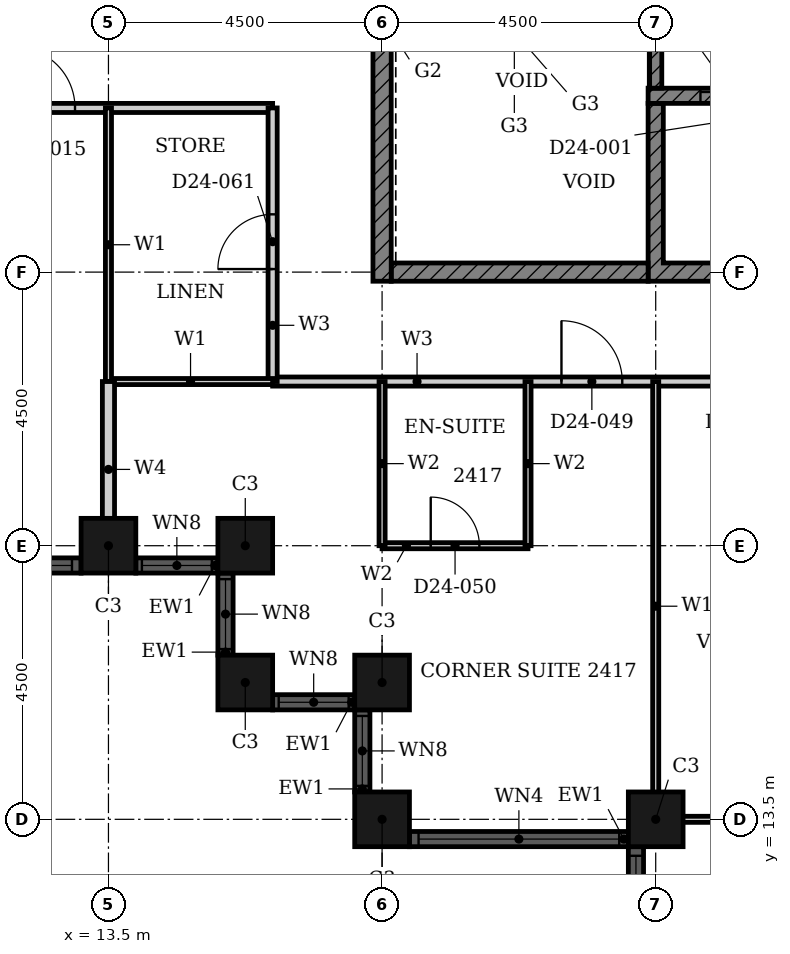
"""IFC4 building model, lengths in metres.
Left out: names, types, materials, properties, quantities, classifications, styles, units other than length and angle.
Written with IfcOpenShell. Run it as: python <this file> out.ifc"""

import sys

from ifc_helpers import new_model, si_unit, direction, frame, frame_2d, origin, origin_2d, place, context, subcontext, project, spatial, polyline, rectangle, hollow_rectangle, outline, extrude, element, fill, save


model = new_model("IFC4")
c1 = context("Model", 3, precision=1e-05, world=origin(), true_north=direction((0.0, 1.0)))
c2 = subcontext(c1, "Body", "Model", "MODEL_VIEW")
j1 = project(units=[si_unit("LENGTHUNIT", "METRE"), si_unit("PLANEANGLEUNIT", "RADIAN")], contexts=[c1])
p1 = place(None, origin())
s1 = spatial("IfcSite", under=j1, at=p1, CompositionType="ELEMENT")
p2 = place(p1, origin())
s2 = spatial("IfcBuilding", under=s1, at=p2, CompositionType="ELEMENT")
p3 = place(p2, frame((0.0, 0.0, 100.8)))
s3 = spatial("IfcBuildingStorey", under=s2, at=p3, CompositionType="ELEMENT", Elevation=100.8)
for number, where, z_axis, x_axis in (
    (1, (13.5, 18.0, 0.0), (0.0, 0.0, 1.0), (1.0, 0.0, 0.0)),
    (2, (15.75, 18.0, 0.0), (0.0, 0.0, 1.0), (1.0, 0.0, 0.0)),
    (3, (15.75, 15.75, 0.0), (0.0, 0.0, 1.0), (1.0, 0.0, 0.0)),
    (4, (18.0, 15.75, 0.0), (0.0, 0.0, 1.0), (1.0, 0.0, 0.0)),
    (5, (18.0, 13.5, 0.0), (0.0, 0.0, 1.0), (1.0, 0.0, 0.0)),
    (6, (22.5, 13.5, 0.0), (0.0, 0.0, 1.0), (1.0, 0.0, 0.0)),
):
    element("IfcColumn", number, at=place(p3, frame(where, z_axis=z_axis, x_axis=x_axis)), inside=s3, PredefinedType="COLUMN", context=c2, shape_type="SweptSolid", body=[
        extrude(hollow_rectangle(XDim=0.9, YDim=0.9, WallThickness=0.028, at=origin_2d()), origin(), (0.0, 0.0, 1.0), 3.6),
    ])
p4 = place(p3, frame((4.95, 17.675, 0.0), z_axis=(0.0, 0.0, 1.0), x_axis=(1.0, 0.0, 0.0)))
e7 = element("IfcWall", 7, at=p4, inside=s3, PredefinedType="SOLIDWALL", context=c2, shape_type="SweptSolid", body=[
    extrude(rectangle(XDim=8.1, YDim=0.25, at=frame_2d((4.05, 0.0))), origin(), (0.0, 0.0, 1.0), 3.6),
])
p5 = place(p4, frame((0.15, 0.0, 0.9)))
e8 = element("IfcOpeningElement", 8, at=p5, cuts=e7, PredefinedType="OPENING", context=c2, shape_type="SweptSolid", body=[
    extrude(rectangle(XDim=3.3, YDim=2.08, at=frame_2d((1.65, 1.04))), frame((0.0, 0.135, 0.0), z_axis=(0.0, -1.0, 0.0), x_axis=(1.0, 0.0, 0.0)), (0.0, 0.0, 1.0), 0.27),
])
p6 = place(p4, frame((4.65, 0.0, 0.9)))
e9 = element("IfcOpeningElement", 9, at=p6, cuts=e7, PredefinedType="OPENING", context=c2, shape_type="SweptSolid", body=[
    extrude(rectangle(XDim=3.3, YDim=2.08, at=frame_2d((1.65, 1.04))), frame((0.0, 0.135, 0.0), z_axis=(0.0, -1.0, 0.0), x_axis=(1.0, 0.0, 0.0)), (0.0, 0.0, 1.0), 0.27),
])
p7 = place(p3, frame((13.95, 17.675, 0.0), z_axis=(0.0, 0.0, 1.0), x_axis=(1.0, 0.0, 0.0)))
e10 = element("IfcWall", 10, at=p7, inside=s3, PredefinedType="SOLIDWALL", context=c2, shape_type="SweptSolid", body=[
    extrude(rectangle(XDim=1.35, YDim=0.25, at=frame_2d((0.675, 0.0))), origin(), (0.0, 0.0, 1.0), 3.6),
])
p8 = place(p7, frame((0.1, 0.0, 0.9)))
e11 = element("IfcOpeningElement", 11, at=p8, cuts=e10, PredefinedType="OPENING", context=c2, shape_type="SweptSolid", body=[
    extrude(rectangle(XDim=1.15, YDim=2.08, at=frame_2d((0.575, 1.04))), frame((0.0, 0.135, 0.0), z_axis=(0.0, -1.0, 0.0), x_axis=(1.0, 0.0, 0.0)), (0.0, 0.0, 1.0), 0.27),
])
p9 = place(p3, frame((15.425, 17.55, 0.0), z_axis=(0.0, 0.0, 1.0), x_axis=(0.0, -1.0, 0.0)))
e12 = element("IfcWall", 12, at=p9, inside=s3, PredefinedType="SOLIDWALL", context=c2, shape_type="SweptSolid", body=[
    extrude(rectangle(XDim=1.35, YDim=0.25, at=frame_2d((0.675, 0.0))), origin(), (0.0, 0.0, 1.0), 3.6),
])
p10 = place(p9, frame((0.1, 0.0, 0.9)))
e13 = element("IfcOpeningElement", 13, at=p10, cuts=e12, PredefinedType="OPENING", context=c2, shape_type="SweptSolid", body=[
    extrude(rectangle(XDim=1.15, YDim=2.08, at=frame_2d((0.575, 1.04))), frame((0.0, 0.135, 0.0), z_axis=(0.0, -1.0, 0.0), x_axis=(1.0, 0.0, 0.0)), (0.0, 0.0, 1.0), 0.27),
])
p11 = place(p3, frame((16.2, 15.425, 0.0), z_axis=(0.0, 0.0, 1.0), x_axis=(1.0, 0.0, 0.0)))
e14 = element("IfcWall", 14, at=p11, inside=s3, PredefinedType="SOLIDWALL", context=c2, shape_type="SweptSolid", body=[
    extrude(rectangle(XDim=1.35, YDim=0.25, at=frame_2d((0.675, 0.0))), origin(), (0.0, 0.0, 1.0), 3.6),
])
p12 = place(p11, frame((0.1, 0.0, 0.9)))
e15 = element("IfcOpeningElement", 15, at=p12, cuts=e14, PredefinedType="OPENING", context=c2, shape_type="SweptSolid", body=[
    extrude(rectangle(XDim=1.15, YDim=2.08, at=frame_2d((0.575, 1.04))), frame((0.0, 0.135, 0.0), z_axis=(0.0, -1.0, 0.0), x_axis=(1.0, 0.0, 0.0)), (0.0, 0.0, 1.0), 0.27),
])
p13 = place(p3, frame((17.675, 15.3, 0.0), z_axis=(0.0, 0.0, 1.0), x_axis=(0.0, -1.0, 0.0)))
e16 = element("IfcWall", 16, at=p13, inside=s3, PredefinedType="SOLIDWALL", context=c2, shape_type="SweptSolid", body=[
    extrude(rectangle(XDim=1.35, YDim=0.25, at=frame_2d((0.675, 0.0))), origin(), (0.0, 0.0, 1.0), 3.6),
])
p14 = place(p13, frame((0.1, 0.0, 0.9)))
e17 = element("IfcOpeningElement", 17, at=p14, cuts=e16, PredefinedType="OPENING", context=c2, shape_type="SweptSolid", body=[
    extrude(rectangle(XDim=1.15, YDim=2.08, at=frame_2d((0.575, 1.04))), frame((0.0, 0.135, 0.0), z_axis=(0.0, -1.0, 0.0), x_axis=(1.0, 0.0, 0.0)), (0.0, 0.0, 1.0), 0.27),
])
p15 = place(p3, frame((18.45, 13.175, 0.0), z_axis=(0.0, 0.0, 1.0), x_axis=(1.0, 0.0, 0.0)))
e18 = element("IfcWall", 18, at=p15, inside=s3, PredefinedType="SOLIDWALL", context=c2, shape_type="SweptSolid", body=[
    extrude(rectangle(XDim=3.6, YDim=0.25, at=frame_2d((1.8, 0.0))), origin(), (0.0, 0.0, 1.0), 3.6),
])
p16 = place(p15, frame((0.15, 0.0, 0.9)))
e19 = element("IfcOpeningElement", 19, at=p16, cuts=e18, PredefinedType="OPENING", context=c2, shape_type="SweptSolid", body=[
    extrude(rectangle(XDim=3.3, YDim=2.08, at=frame_2d((1.65, 1.04))), frame((0.0, 0.135, 0.0), z_axis=(0.0, -1.0, 0.0), x_axis=(1.0, 0.0, 0.0)), (0.0, 0.0, 1.0), 0.27),
])
p17 = place(p3, frame((22.175, 13.05, 0.0), z_axis=(0.0, 0.0, 1.0), x_axis=(0.0, -1.0, 0.0)))
e20 = element("IfcWall", 20, at=p17, inside=s3, PredefinedType="SOLIDWALL", context=c2, shape_type="SweptSolid", body=[
    extrude(rectangle(XDim=8.1, YDim=0.25, at=frame_2d((4.05, 0.0))), origin(), (0.0, 0.0, 1.0), 3.6),
])
p18 = place(p17, frame((0.15, 0.0, 0.9)))
e21 = element("IfcOpeningElement", 21, at=p18, cuts=e20, PredefinedType="OPENING", context=c2, shape_type="SweptSolid", body=[
    extrude(rectangle(XDim=3.3, YDim=2.08, at=frame_2d((1.65, 1.04))), frame((0.0, 0.135, 0.0), z_axis=(0.0, -1.0, 0.0), x_axis=(1.0, 0.0, 0.0)), (0.0, 0.0, 1.0), 0.27),
])
p19 = place(p17, frame((4.65, 0.0, 0.9)))
e22 = element("IfcOpeningElement", 22, at=p19, cuts=e20, PredefinedType="OPENING", context=c2, shape_type="SweptSolid", body=[
    extrude(rectangle(XDim=3.3, YDim=2.08, at=frame_2d((1.65, 1.04))), frame((0.0, 0.135, 0.0), z_axis=(0.0, -1.0, 0.0), x_axis=(1.0, 0.0, 0.0)), (0.0, 0.0, 1.0), 0.27),
])
p20 = place(p3, origin())
e23 = element("IfcWall", 23, at=p20, inside=s3, PredefinedType="SHEAR", context=c2, shape_type="SweptSolid", body=[
    extrude(outline(polyline([(22.375, 22.35), (38.053, 22.35), (38.053, 25.275), (37.803, 25.275), (37.803, 22.65), (35.482, 22.65), (35.482, 25.275), (35.232, 25.275), (35.232, 22.65), (32.911, 22.65), (32.911, 25.275), (32.661, 25.275), (32.661, 22.65), (30.339, 22.65), (30.339, 25.275), (30.089, 25.275), (30.089, 22.65), (27.768, 22.65), (27.768, 25.275), (27.518, 25.275), (27.518, 22.65), (25.197, 22.65), (25.197, 25.275), (24.947, 25.275), (24.947, 22.65), (22.625, 22.65), (22.625, 25.275), (22.375, 25.275), (22.375, 22.35)])), origin(), (0.0, 0.0, 1.0), 3.3),
])
p21 = place(p3, frame((18.15, 22.5, 0.0), z_axis=(0.0, 0.0, 1.0), x_axis=(1.0, 0.0, 0.0)))
e24 = element("IfcWall", 24, at=p21, inside=s3, PredefinedType="SHEAR", context=c2, shape_type="SweptSolid", body=[
    extrude(rectangle(XDim=4.225, YDim=0.3, at=frame_2d((2.113, 0.0))), origin(), (0.0, 0.0, 1.0), 3.3),
])
p22 = place(p3, frame((18.0, 22.35, 0.0), z_axis=(0.0, 0.0, 1.0), x_axis=(0.0, 1.0, 0.0)))
e25 = element("IfcWall", 25, at=p22, inside=s3, PredefinedType="SHEAR", context=c2, shape_type="SweptSolid", body=[
    extrude(rectangle(XDim=9.3, YDim=0.3, at=frame_2d((4.65, 0.0))), origin(), (0.0, 0.0, 1.0), 3.3),
])
p23 = place(p3, frame((22.375, 25.4, 0.0), z_axis=(0.0, 0.0, 1.0), x_axis=(1.0, 0.0, 0.0)))
e26 = element("IfcWall", 26, at=p23, inside=s3, PredefinedType="SHEAR", context=c2, shape_type="SweptSolid", body=[
    extrude(rectangle(XDim=15.678, YDim=0.25, at=frame_2d((7.839, 0.0))), origin(), (0.0, 0.0, 1.0), 3.3),
])
p24 = place(p23, frame((3.432, 0.0, 0.0)))
e27 = element("IfcOpeningElement", 27, at=p24, cuts=e26, PredefinedType="OPENING", context=c2, shape_type="SweptSolid", body=[
    extrude(rectangle(XDim=1.1, YDim=2.1, at=frame_2d((0.55, 1.05))), frame((0.0, 0.135, 0.0), z_axis=(0.0, -1.0, 0.0), x_axis=(1.0, 0.0, 0.0)), (0.0, 0.0, 1.0), 0.27),
])
p25 = place(p23, frame((11.146, 0.0, 0.0)))
e28 = element("IfcOpeningElement", 28, at=p25, cuts=e26, PredefinedType="OPENING", context=c2, shape_type="SweptSolid", body=[
    extrude(rectangle(XDim=1.1, YDim=2.1, at=frame_2d((0.55, 1.05))), frame((0.0, 0.135, 0.0), z_axis=(0.0, -1.0, 0.0), x_axis=(1.0, 0.0, 0.0)), (0.0, 0.0, 1.0), 0.27),
])
p26 = place(p23, frame((13.718, 0.0, 0.0)))
e29 = element("IfcOpeningElement", 29, at=p26, cuts=e26, PredefinedType="OPENING", context=c2, shape_type="SweptSolid", body=[
    extrude(rectangle(XDim=1.1, YDim=2.1, at=frame_2d((0.55, 1.05))), frame((0.0, 0.135, 0.0), z_axis=(0.0, -1.0, 0.0), x_axis=(1.0, 0.0, 0.0)), (0.0, 0.0, 1.0), 0.27),
])
p27 = place(p23, frame((0.861, 0.0, 0.0)))
e30 = element("IfcOpeningElement", 30, at=p27, cuts=e26, PredefinedType="OPENING", context=c2, shape_type="SweptSolid", body=[
    extrude(rectangle(XDim=1.1, YDim=2.1, at=frame_2d((0.55, 1.05))), frame((0.0, 0.135, 0.0), z_axis=(0.0, -1.0, 0.0), x_axis=(1.0, 0.0, 0.0)), (0.0, 0.0, 1.0), 0.27),
])
p28 = place(p3, frame((22.5, 31.35, 0.0), z_axis=(0.0, 0.0, 1.0), x_axis=(0.0, -1.0, 0.0)))
e31 = element("IfcWall", 31, at=p28, inside=s3, PredefinedType="SHEAR", context=c2, shape_type="SweptSolid", body=[
    extrude(rectangle(XDim=5.825, YDim=0.2, at=frame_2d((2.913, 0.0))), origin(), (0.0, 0.0, 1.0), 3.3),
])
p29 = place(p28, frame((0.25, 0.0, 0.0)))
e32 = element("IfcOpeningElement", 32, at=p29, cuts=e31, PredefinedType="OPENING", context=c2, shape_type="SweptSolid", body=[
    extrude(rectangle(XDim=1.8, YDim=2.1, at=frame_2d((0.9, 1.05))), frame((0.0, 0.11, 0.0), z_axis=(0.0, -1.0, 0.0), x_axis=(1.0, 0.0, 0.0)), (0.0, 0.0, 1.0), 0.22),
])
p30 = place(p3, frame((16.2, 20.7, 0.0), z_axis=(0.0, 0.0, 1.0), x_axis=(1.0, 0.0, 0.0)))
e33 = element("IfcWall", 33, at=p30, inside=s3, PredefinedType="PARTITIONING", context=c2, shape_type="SweptSolid", body=[
    extrude(rectangle(XDim=13.5, YDim=0.15, at=frame_2d((6.75, 0.0))), origin(), (0.0, 0.0, 1.0), 3.3),
])
p31 = place(p30, frame((4.75, 0.0, 0.0)))
e34 = element("IfcOpeningElement", 34, at=p31, cuts=e33, PredefinedType="OPENING", context=c2, shape_type="SweptSolid", body=[
    extrude(rectangle(XDim=1.0, YDim=2.1, at=frame_2d((0.5, 1.05))), frame((0.0, 0.085, 0.0), z_axis=(0.0, -1.0, 0.0), x_axis=(1.0, 0.0, 0.0)), (0.0, 0.0, 1.0), 0.17),
])
p32 = place(p30, frame((7.35, 0.0, 0.0)))
e35 = element("IfcOpeningElement", 35, at=p32, cuts=e33, PredefinedType="OPENING", context=c2, shape_type="SweptSolid", body=[
    extrude(rectangle(XDim=0.9, YDim=2.1, at=frame_2d((0.45, 1.05))), frame((0.0, 0.085, 0.0), z_axis=(0.0, -1.0, 0.0), x_axis=(1.0, 0.0, 0.0)), (0.0, 0.0, 1.0), 0.17),
])
p33 = place(p30, frame((10.95, 0.0, 0.0)))
e36 = element("IfcOpeningElement", 36, at=p33, cuts=e33, PredefinedType="OPENING", context=c2, shape_type="SweptSolid", body=[
    extrude(rectangle(XDim=0.9, YDim=2.1, at=frame_2d((0.45, 1.05))), frame((0.0, 0.085, 0.0), z_axis=(0.0, -1.0, 0.0), x_axis=(1.0, 0.0, 0.0)), (0.0, 0.0, 1.0), 0.17),
])
p34 = place(p3, frame((4.5, 25.2, 0.0), z_axis=(0.0, 0.0, 1.0), x_axis=(1.0, 0.0, 0.0)))
e37 = element("IfcWall", 37, at=p34, inside=s3, PredefinedType="PARTITIONING", context=c2, shape_type="SweptSolid", body=[
    extrude(rectangle(XDim=11.7, YDim=0.15, at=frame_2d((5.85, 0.0))), origin(), (0.0, 0.0, 1.0), 3.3),
])
p35 = place(p34, frame((7.45, 0.0, 0.0)))
e38 = element("IfcOpeningElement", 38, at=p35, cuts=e37, PredefinedType="OPENING", context=c2, shape_type="SweptSolid", body=[
    extrude(rectangle(XDim=1.0, YDim=2.1, at=frame_2d((0.5, 1.05))), frame((0.0, 0.085, 0.0), z_axis=(0.0, -1.0, 0.0), x_axis=(1.0, 0.0, 0.0)), (0.0, 0.0, 1.0), 0.17),
])
p36 = place(p34, frame((2.95, 0.0, 0.0)))
e39 = element("IfcOpeningElement", 39, at=p36, cuts=e37, PredefinedType="OPENING", context=c2, shape_type="SweptSolid", body=[
    extrude(rectangle(XDim=1.0, YDim=2.1, at=frame_2d((0.5, 1.05))), frame((0.0, 0.085, 0.0), z_axis=(0.0, -1.0, 0.0), x_axis=(1.0, 0.0, 0.0)), (0.0, 0.0, 1.0), 0.17),
])
p37 = place(p3, frame((16.2, 20.7, 0.0), z_axis=(0.0, 0.0, 1.0), x_axis=(0.0, 1.0, 0.0)))
e40 = element("IfcWall", 40, at=p37, inside=s3, PredefinedType="PARTITIONING", context=c2, shape_type="SweptSolid", body=[
    extrude(rectangle(XDim=4.5, YDim=0.15, at=frame_2d((2.25, 0.0))), origin(), (0.0, 0.0, 1.0), 3.3),
])
p38 = place(p37, frame((1.85, 0.0, 0.0)))
e41 = element("IfcOpeningElement", 41, at=p38, cuts=e40, PredefinedType="OPENING", context=c2, shape_type="SweptSolid", body=[
    extrude(rectangle(XDim=0.9, YDim=2.1, at=frame_2d((0.45, 1.05))), frame((0.0, 0.085, 0.0), z_axis=(0.0, -1.0, 0.0), x_axis=(1.0, 0.0, 0.0)), (0.0, 0.0, 1.0), 0.17),
])
p39 = place(p3, frame((22.31, 13.5, 0.0), z_axis=(0.0, 0.0, 1.0), x_axis=(1.0, 0.0, 0.0)))
e42 = element("IfcWall", 42, at=p39, inside=s3, PredefinedType="PARTITIONING", context=c2, shape_type="SweptSolid", body=[
    extrude(rectangle(XDim=7.39, YDim=0.1, at=frame_2d((3.695, 0.0))), origin(), (0.0, 0.0, 1.0), 2.38),
])
p40 = place(p3, frame((13.5, 20.7, 0.0), z_axis=(0.0, 0.0, 1.0), x_axis=(1.0, 0.0, 0.0)))
e43 = element("IfcWall", 43, at=p40, inside=s3, PredefinedType="PARTITIONING", context=c2, shape_type="SweptSolid", body=[
    extrude(rectangle(XDim=2.7, YDim=0.1, at=frame_2d((1.35, 0.0))), origin(), (0.0, 0.0, 1.0), 3.3),
])
p41 = place(p3, frame((13.5, 20.7, 0.0), z_axis=(0.0, 0.0, 1.0), x_axis=(0.0, 1.0, 0.0)))
e44 = element("IfcWall", 44, at=p41, inside=s3, PredefinedType="PARTITIONING", context=c2, shape_type="SweptSolid", body=[
    extrude(rectangle(XDim=4.5, YDim=0.1, at=frame_2d((2.25, 0.0))), origin(), (0.0, 0.0, 1.0), 2.38),
])
p42 = place(p3, frame((22.5, 13.31, 0.0), z_axis=(0.0, 0.0, 1.0), x_axis=(0.0, 1.0, 0.0)))
e45 = element("IfcWall", 45, at=p42, inside=s3, PredefinedType="PARTITIONING", context=c2, shape_type="SweptSolid", body=[
    extrude(rectangle(XDim=7.39, YDim=0.1, at=frame_2d((3.695, 0.0))), origin(), (0.0, 0.0, 1.0), 3.3),
])
p43 = place(p3, frame((13.5, 17.81, 0.0), z_axis=(0.0, 0.0, 1.0), x_axis=(0.0, 1.0, 0.0)))
e46 = element("IfcWall", 46, at=p43, inside=s3, PredefinedType="PARTITIONING", context=c2, shape_type="SweptSolid", body=[
    extrude(rectangle(XDim=2.89, YDim=0.2, at=frame_2d((1.445, 0.0))), origin(), (0.0, 0.0, 1.0), 2.38),
])
p44 = place(p3, frame((18.0, 18.0, 0.0), z_axis=(0.0, 0.0, 1.0), x_axis=(1.0, 0.0, 0.0)))
e47 = element("IfcWall", 47, at=p44, inside=s3, PredefinedType="PARTITIONING", context=c2, shape_type="SweptSolid", body=[
    extrude(rectangle(XDim=2.4, YDim=0.1, at=frame_2d((1.2, 0.0))), origin(), (0.0, 0.0, 1.0), 3.3),
])
p45 = place(p44, frame((0.8, 0.0, 0.0)))
e48 = element("IfcOpeningElement", 48, at=p45, cuts=e47, PredefinedType="OPENING", context=c2, shape_type="SweptSolid", body=[
    extrude(rectangle(XDim=0.8, YDim=2.1, at=frame_2d((0.4, 1.05))), frame((0.0, 0.06, 0.0), z_axis=(0.0, -1.0, 0.0), x_axis=(1.0, 0.0, 0.0)), (0.0, 0.0, 1.0), 0.12),
])
for number, where, z_axis, x_axis in (
    (49, (18.0, 18.0, 0.0), (0.0, 0.0, 1.0), (0.0, 1.0, 0.0)),
    (50, (20.4, 18.0, 0.0), (0.0, 0.0, 1.0), (0.0, 1.0, 0.0)),
):
    element("IfcWall", number, at=place(p3, frame(where, z_axis=z_axis, x_axis=x_axis)), inside=s3, PredefinedType="PARTITIONING", context=c2, shape_type="SweptSolid", body=[
        extrude(rectangle(XDim=2.7, YDim=0.1, at=frame_2d((1.35, 0.0))), origin(), (0.0, 0.0, 1.0), 3.3),
    ])
p46 = place(p6, origin())
e51 = element("IfcWindow", 51, at=p46, inside=s3, PartitioningType="SINGLE_PANEL", PredefinedType="WINDOW", context=c2, shape_type="SweptSolid", body=[
    extrude(rectangle(XDim=3.3, YDim=2.08, at=frame_2d((1.65, 1.04))), frame((0.0, 0.03, 0.0), z_axis=(0.0, -1.0, 0.0), x_axis=(1.0, 0.0, 0.0)), (0.0, 0.0, 1.0), 0.06),
])
fill(e9, e51)
p47 = place(p8, origin())
e52 = element("IfcWindow", 52, at=p47, inside=s3, PartitioningType="SINGLE_PANEL", PredefinedType="WINDOW", context=c2, shape_type="SweptSolid", body=[
    extrude(rectangle(XDim=1.15, YDim=2.08, at=frame_2d((0.575, 1.04))), frame((0.0, 0.03, 0.0), z_axis=(0.0, -1.0, 0.0), x_axis=(1.0, 0.0, 0.0)), (0.0, 0.0, 1.0), 0.06),
])
fill(e11, e52)
p48 = place(p10, origin())
e53 = element("IfcWindow", 53, at=p48, inside=s3, PartitioningType="SINGLE_PANEL", PredefinedType="WINDOW", context=c2, shape_type="SweptSolid", body=[
    extrude(rectangle(XDim=1.15, YDim=2.08, at=frame_2d((0.575, 1.04))), frame((0.0, 0.03, 0.0), z_axis=(0.0, -1.0, 0.0), x_axis=(1.0, 0.0, 0.0)), (0.0, 0.0, 1.0), 0.06),
])
fill(e13, e53)
p49 = place(p12, origin())
e54 = element("IfcWindow", 54, at=p49, inside=s3, PartitioningType="SINGLE_PANEL", PredefinedType="WINDOW", context=c2, shape_type="SweptSolid", body=[
    extrude(rectangle(XDim=1.15, YDim=2.08, at=frame_2d((0.575, 1.04))), frame((0.0, 0.03, 0.0), z_axis=(0.0, -1.0, 0.0), x_axis=(1.0, 0.0, 0.0)), (0.0, 0.0, 1.0), 0.06),
])
fill(e15, e54)
p50 = place(p14, origin())
e55 = element("IfcWindow", 55, at=p50, inside=s3, PartitioningType="SINGLE_PANEL", PredefinedType="WINDOW", context=c2, shape_type="SweptSolid", body=[
    extrude(rectangle(XDim=1.15, YDim=2.08, at=frame_2d((0.575, 1.04))), frame((0.0, 0.03, 0.0), z_axis=(0.0, -1.0, 0.0), x_axis=(1.0, 0.0, 0.0)), (0.0, 0.0, 1.0), 0.06),
])
fill(e17, e55)
p51 = place(p16, origin())
e56 = element("IfcWindow", 56, at=p51, inside=s3, PartitioningType="SINGLE_PANEL", PredefinedType="WINDOW", context=c2, shape_type="SweptSolid", body=[
    extrude(rectangle(XDim=3.3, YDim=2.08, at=frame_2d((1.65, 1.04))), frame((0.0, 0.03, 0.0), z_axis=(0.0, -1.0, 0.0), x_axis=(1.0, 0.0, 0.0)), (0.0, 0.0, 1.0), 0.06),
])
fill(e19, e56)
p52 = place(p18, origin())
e57 = element("IfcWindow", 57, at=p52, inside=s3, PartitioningType="SINGLE_PANEL", PredefinedType="WINDOW", context=c2, shape_type="SweptSolid", body=[
    extrude(rectangle(XDim=3.3, YDim=2.08, at=frame_2d((1.65, 1.04))), frame((0.0, 0.03, 0.0), z_axis=(0.0, -1.0, 0.0), x_axis=(1.0, 0.0, 0.0)), (0.0, 0.0, 1.0), 0.06),
])
fill(e21, e57)
p53 = place(p27, origin())
e58 = element("IfcDoor", 58, at=p53, inside=s3, OperationType="DOUBLE_DOOR_SLIDING", PredefinedType="DOOR", context=c2, shape_type="SweptSolid", body=[
    extrude(rectangle(XDim=1.1, YDim=2.1, at=frame_2d((0.55, 1.05))), frame((0.0, 0.025, 0.0), z_axis=(0.0, -1.0, 0.0), x_axis=(1.0, 0.0, 0.0)), (0.0, 0.0, 1.0), 0.05),
])
fill(e30, e58)
p54 = place(p35, origin())
e59 = element("IfcDoor", 59, at=p54, inside=s3, OperationType="SINGLE_SWING_RIGHT", PredefinedType="DOOR", context=c2, shape_type="SweptSolid", body=[
    extrude(rectangle(XDim=1.0, YDim=2.1, at=frame_2d((0.5, 1.05))), frame((0.0, 0.025, 0.0), z_axis=(0.0, -1.0, 0.0), x_axis=(1.0, 0.0, 0.0)), (0.0, 0.0, 1.0), 0.05),
])
fill(e38, e59)
p55 = place(p31, origin())
e60 = element("IfcDoor", 60, at=p55, inside=s3, OperationType="SINGLE_SWING_RIGHT", PredefinedType="DOOR", context=c2, shape_type="SweptSolid", body=[
    extrude(rectangle(XDim=1.0, YDim=2.1, at=frame_2d((0.5, 1.05))), frame((0.0, 0.025, 0.0), z_axis=(0.0, -1.0, 0.0), x_axis=(1.0, 0.0, 0.0)), (0.0, 0.0, 1.0), 0.05),
])
fill(e34, e60)
p56 = place(p45, origin())
e61 = element("IfcDoor", 61, at=p56, inside=s3, OperationType="SINGLE_SWING_LEFT", PredefinedType="DOOR", context=c2, shape_type="SweptSolid", body=[
    extrude(rectangle(XDim=0.8, YDim=2.1, at=frame_2d((0.4, 1.05))), frame((0.0, 0.025, 0.0), z_axis=(0.0, -1.0, 0.0), x_axis=(1.0, 0.0, 0.0)), (0.0, 0.0, 1.0), 0.05),
])
fill(e48, e61)
p57 = place(p38, origin())
e62 = element("IfcDoor", 62, at=p57, inside=s3, OperationType="SINGLE_SWING_RIGHT", PredefinedType="DOOR", context=c2, shape_type="SweptSolid", body=[
    extrude(rectangle(XDim=0.9, YDim=2.1, at=frame_2d((0.45, 1.05))), frame((0.0, 0.025, 0.0), z_axis=(0.0, -1.0, 0.0), x_axis=(1.0, 0.0, 0.0)), (0.0, 0.0, 1.0), 0.05),
])
fill(e41, e62)
save(model, sys.argv[1])
